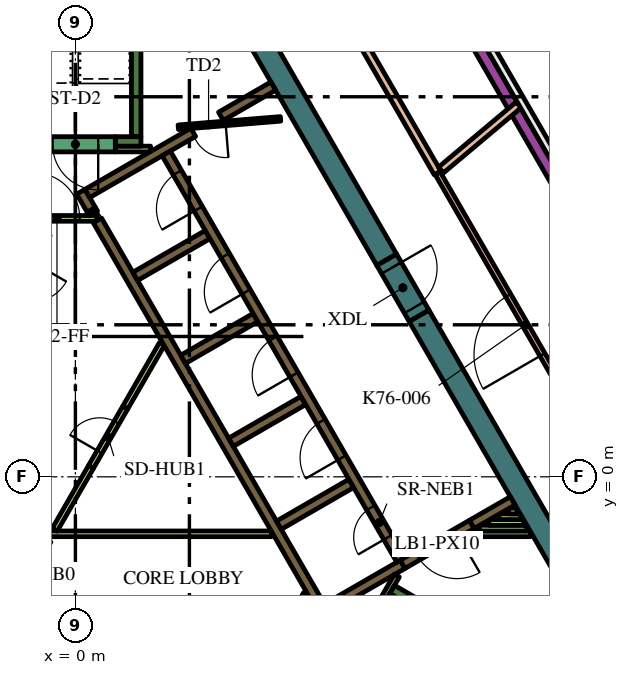
"""IFC4 building model, lengths in metres.
Left out: names, types, materials, properties, quantities, classifications, styles, units other than length and angle.
Written with IfcOpenShell. Run it as: python <this file> out.ifc"""

import sys

from ifc_helpers import new_model, si_unit, direction, frame, frame_2d, origin, place, context, subcontext, project, spatial, rectangle, extrude, element, fill, save


model = new_model("IFC4")
c1 = context("Model", 3, precision=1e-05, world=origin(), true_north=direction((0.0, 1.0)))
c2 = subcontext(c1, "Body", "Model", "MODEL_VIEW")
j1 = project(units=[si_unit("LENGTHUNIT", "METRE"), si_unit("PLANEANGLEUNIT", "RADIAN")], contexts=[c1])
p1 = place(None, origin())
s1 = spatial("IfcSite", under=j1, at=p1, CompositionType="ELEMENT")
p2 = place(p1, origin())
s2 = spatial("IfcBuilding", under=s1, at=p2, CompositionType="ELEMENT")
p3 = place(p2, frame((0.0, 0.0, 327.6)))
s3 = spatial("IfcBuildingStorey", under=s2, at=p3, CompositionType="ELEMENT", Elevation=327.6)
for number, where, z_axis, x_axis in (
    (1, (9.042, 4.239, 0.0), (0.0, 0.0, 1.0), (0.5, -0.866, 0.0)),
    (2, (1.989, 16.456, 0.0), (0.0, 0.0, 1.0), (0.5, -0.866, 0.0)),
):
    element("IfcWall", number, at=place(p3, frame(where, z_axis=z_axis, x_axis=x_axis)), inside=s3, PredefinedType="SOLIDWALL", context=c2, shape_type="SweptSolid", body=[
        extrude(rectangle(XDim=12.406, YDim=0.6, at=frame_2d((6.203, 0.0))), origin(), (0.0, 0.0, 1.0), 4.2),
    ])
p4 = place(p3, frame((8.334, -2.964, 0.0), z_axis=(0.0, 0.0, 1.0), x_axis=(0.866016039709, -0.500016218704, 0.0)))
e3 = element("IfcWall", 3, at=p4, inside=s3, PredefinedType="SOLIDWALL", context=c2, shape_type="SweptSolid", body=[
    extrude(rectangle(XDim=7.05, YDim=0.25, at=frame_2d((3.525, 0.0))), origin(), (0.0, 0.0, 1.0), 4.2),
])
p5 = place(p3, frame((8.168, -3.503, 0.0), z_axis=(0.0, 0.0, 1.0), x_axis=(0.49972245349, 0.866185586049, 0.0)))
e4 = element("IfcWall", 4, at=p5, inside=s3, PredefinedType="SOLIDWALL", context=c2, shape_type="SweptSolid", body=[
    extrude(rectangle(XDim=0.425, YDim=0.25, at=frame_2d((0.212, 0.0))), origin(), (0.0, 0.0, 1.0), 4.2),
])
p6 = place(p3, frame((1.6, 8.95, 0.0), z_axis=(0.0, 0.0, 1.0), x_axis=(0.0, 1.0, 0.0)))
e5 = element("IfcWall", 5, at=p6, inside=s3, PredefinedType="SOLIDWALL", context=c2, shape_type="SweptSolid", body=[
    extrude(rectangle(XDim=6.8, YDim=0.25, at=frame_2d((3.4, 0.0))), origin(), (0.0, 0.0, 1.0), 4.2),
])
p7 = place(p3, frame((1.05, 8.825, 0.0), z_axis=(0.0, 0.0, 1.0), x_axis=(1.0, 0.0, 0.0)))
e6 = element("IfcWall", 6, at=p7, inside=s3, PredefinedType="SOLIDWALL", context=c2, shape_type="SweptSolid", body=[
    extrude(rectangle(XDim=0.675, YDim=0.25, at=frame_2d((0.337, 0.0))), origin(), (0.0, 0.0, 1.0), 4.2),
])
p8 = place(p3, frame((11.507, -0.631, 0.0), z_axis=(0.0, 0.0, 1.0), x_axis=(-0.866025525965, -0.499999788377, 0.0)))
e7 = element("IfcWall", 7, at=p8, inside=s3, PredefinedType="SOLIDWALL", context=c2, shape_type="SweptSolid", body=[
    extrude(rectangle(XDim=1.245, YDim=0.25, at=frame_2d((0.622, 0.0))), origin(), (0.0, 0.0, 1.0), 4.2),
])
p9 = place(p3, frame((0.473, 6.93, 0.0), z_axis=(0.0, 0.0, 1.0), x_axis=(-0.49972245349, 0.866185586049, 0.0)))
e8 = element("IfcWall", 8, at=p9, inside=s3, PredefinedType="SOLIDWALL", context=c2, shape_type="SweptSolid", body=[
    extrude(rectangle(XDim=0.11, YDim=0.25, at=frame_2d((0.055, 0.0))), origin(), (0.0, 0.0, 1.0), 4.2),
])
p10 = place(p3, frame((6.568, -3.627, 0.0), z_axis=(0.0, 0.0, 1.0), x_axis=(-0.499999455981, 0.866025717874, 0.0)))
e9 = element("IfcWall", 9, at=p10, inside=s3, PredefinedType="SOLIDWALL", context=c2, shape_type="SweptSolid", body=[
    extrude(rectangle(XDim=11.978, YDim=0.25, at=frame_2d((5.989, 0.0))), origin(), (0.0, 0.0, 1.0), 4.2),
])
p11 = place(p3, frame((0.417, 7.027, 0.0), z_axis=(0.0, 0.0, 1.0), x_axis=(-0.500210807569, 0.865903659763, 0.0)))
e10 = element("IfcWall", 10, at=p11, inside=s3, PredefinedType="SOLIDWALL", context=c2, shape_type="SweptSolid", body=[
    extrude(rectangle(XDim=0.548, YDim=0.25, at=frame_2d((0.274, 0.0))), origin(), (0.0, 0.0, 1.0), 4.2),
])
p12 = place(p3, frame((3.1, 9.064, 0.0), z_axis=(0.0, 0.0, 1.0), x_axis=(-0.866030133475, -0.499991807846, 0.0)))
e11 = element("IfcWall", 11, at=p12, inside=s3, PredefinedType="SOLIDWALL", context=c2, shape_type="SweptSolid", body=[
    extrude(rectangle(XDim=3.217, YDim=0.25, at=frame_2d((1.608, 0.0))), origin(), (0.0, 0.0, 1.0), 4.2),
])
p13 = place(p3, frame((1.574, 5.274, 0.0), z_axis=(0.0, 0.0, 1.0), x_axis=(0.866028486751, 0.499994660107, 0.0)))
e12 = element("IfcWall", 12, at=p13, inside=s3, PredefinedType="SOLIDWALL", context=c2, shape_type="SweptSolid", body=[
    extrude(rectangle(XDim=2.2, YDim=0.25, at=frame_2d((1.1, 0.0))), origin(), (0.0, 0.0, 1.0), 4.2),
])
for number, where, z_axis, x_axis in (
    (13, (2.834, 3.091, 0.0), (0.0, 0.0, 1.0), (0.866, 0.5, 0.0)),
    (14, (4.094, 0.909, 0.0), (0.0, 0.0, 1.0), (0.866, 0.5, 0.0)),
    (15, (5.354, -1.274, 0.0), (0.0, 0.0, 1.0), (0.866, 0.5, 0.0)),
):
    element("IfcWall", number, at=place(p3, frame(where, z_axis=z_axis, x_axis=x_axis)), inside=s3, PredefinedType="SOLIDWALL", context=c2, shape_type="SweptSolid", body=[
        extrude(rectangle(XDim=2.2, YDim=0.25, at=frame_2d((1.1, 0.0))), origin(), (0.0, 0.0, 1.0), 4.2),
    ])
p14 = place(p3, frame((6.614, -3.456, 0.0), z_axis=(0.0, 0.0, 1.0), x_axis=(0.866025089694, 0.500000544019, 0.0)))
e16 = element("IfcWall", 16, at=p14, inside=s3, PredefinedType="SOLIDWALL", context=c2, shape_type="SweptSolid", body=[
    extrude(rectangle(XDim=2.305, YDim=0.25, at=frame_2d((1.153, 0.0))), origin(), (0.0, 0.0, 1.0), 4.2),
])
p15 = place(p3, frame((3.83, 9.486, 0.0), z_axis=(0.0, 0.0, 1.0), x_axis=(0.865986202621, 0.500067892261, 0.0)))
e17 = element("IfcWall", 17, at=p15, inside=s3, PredefinedType="SOLIDWALL", context=c2, shape_type="SweptSolid", body=[
    extrude(rectangle(XDim=1.591, YDim=0.25, at=frame_2d((0.795, 0.0))), origin(), (0.0, 0.0, 1.0), 4.2),
])
p16 = place(p3, frame((1.05, 8.625, 0.0), z_axis=(0.0, 0.0, 1.0), x_axis=(1.0, 0.0, 0.0)))
e18 = element("IfcWall", 18, at=p16, inside=s3, PredefinedType="PARTITIONING", context=c2, shape_type="SweptSolid", body=[
    extrude(rectangle(XDim=0.929, YDim=0.15, at=frame_2d((0.464, 0.0))), origin(), (0.0, 0.0, 1.0), 3.45),
])
p17 = place(p3, frame((10.362, -1.5, 0.0), z_axis=(0.0, 0.0, 1.0), x_axis=(1.0, 0.0, 0.0)))
e19 = element("IfcWall", 19, at=p17, inside=s3, PredefinedType="PARTITIONING", context=c2, shape_type="SweptSolid", body=[
    extrude(rectangle(XDim=1.61, YDim=0.15, at=frame_2d((0.805, 0.0))), origin(), (0.0, 0.0, 1.0), 3.45),
])
p18 = place(p3, frame((10.622, -1.35, 0.0), z_axis=(0.0, 0.0, 1.0), x_axis=(1.0, 0.0, 0.0)))
e20 = element("IfcWall", 20, at=p18, inside=s3, PredefinedType="PARTITIONING", context=c2, shape_type="SweptSolid", body=[
    extrude(rectangle(XDim=1.263, YDim=0.15, at=frame_2d((0.632, 0.0))), origin(), (0.0, 0.0, 1.0), 3.45),
])
p19 = place(p3, frame((10.882, -1.2, 0.0), z_axis=(0.0, 0.0, 1.0), x_axis=(1.0, 0.0, 0.0)))
e21 = element("IfcWall", 21, at=p19, inside=s3, PredefinedType="PARTITIONING", context=c2, shape_type="SweptSolid", body=[
    extrude(rectangle(XDim=0.917, YDim=0.15, at=frame_2d((0.459, 0.0))), origin(), (0.0, 0.0, 1.0), 3.45),
])
p20 = place(p3, frame((11.712, -1.05, 0.0), z_axis=(0.0, 0.0, 1.0), x_axis=(-1.0, 0.0, 0.0)))
e22 = element("IfcWall", 22, at=p20, inside=s3, PredefinedType="PARTITIONING", context=c2, shape_type="SweptSolid", body=[
    extrude(rectangle(XDim=0.571, YDim=0.15, at=frame_2d((0.285, 0.0))), origin(), (0.0, 0.0, 1.0), 3.45),
])
p21 = place(p3, frame((11.401, -0.9, 0.0), z_axis=(0.0, 0.0, 1.0), x_axis=(1.0, 0.0, 0.0)))
e23 = element("IfcWall", 23, at=p21, inside=s3, PredefinedType="PARTITIONING", context=c2, shape_type="SweptSolid", body=[
    extrude(rectangle(XDim=0.224, YDim=0.15, at=frame_2d((0.112, 0.0))), origin(), (0.0, 0.0, 1.0), 3.45),
])
p22 = place(p3, frame((8.459, -2.599, 0.0), z_axis=(0.0, 0.0, 1.0), x_axis=(-0.500041054325, -0.866001699761, 0.0)))
e24 = element("IfcWall", 24, at=p22, inside=s3, PredefinedType="PARTITIONING", context=c2, shape_type="SweptSolid", body=[
    extrude(rectangle(XDim=0.929, YDim=0.15, at=frame_2d((0.464, 0.0))), origin(), (0.0, 0.0, 1.0), 4.2),
])
p23 = place(p3, frame((5.705, -3.718, 0.0), z_axis=(0.0, 0.0, 1.0), x_axis=(0.499962090823, 0.866047289552, 0.0)))
e25 = element("IfcWall", 25, at=p23, inside=s3, PredefinedType="PARTITIONING", context=c2, shape_type="SweptSolid", body=[
    extrude(rectangle(XDim=0.735, YDim=0.15, at=frame_2d((0.367, 0.0))), origin(), (0.0, 0.0, 1.0), 3.45),
])
p24 = place(p3, frame((-4.2, -1.5, 0.0), z_axis=(0.0, 0.0, 1.0), x_axis=(1.0, 0.0, 0.0)))
e26 = element("IfcWall", 26, at=p24, inside=s3, PredefinedType="PARTITIONING", context=c2, shape_type="SweptSolid", body=[
    extrude(rectangle(XDim=9.359, YDim=0.15, at=frame_2d((4.68, 0.0))), origin(), (0.0, 0.0, 1.0), 3.45),
])
p25 = place(p3, frame((-0.544, -1.393, 0.0), z_axis=(0.0, 0.0, 1.0), x_axis=(0.499928740635, 0.866066541489, 0.0)))
e27 = element("IfcWall", 27, at=p25, inside=s3, PredefinedType="PARTITIONING", context=c2, shape_type="SweptSolid", body=[
    extrude(rectangle(XDim=1.912, YDim=0.15, at=frame_2d((0.956, 0.0))), origin(), (0.0, 0.0, 1.0), 3.45),
])
p26 = place(p3, frame((1.312, 1.822, 0.0), z_axis=(0.0, 0.0, 1.0), x_axis=(0.500003549559, 0.866023354436, 0.0)))
e28 = element("IfcWall", 28, at=p26, inside=s3, PredefinedType="PARTITIONING", context=c2, shape_type="SweptSolid", body=[
    extrude(rectangle(XDim=1.93, YDim=0.15, at=frame_2d((0.965, 0.0))), origin(), (0.0, 0.0, 1.0), 3.45),
])
p27 = place(p3, frame((8.565, -2.185, 0.0), z_axis=(0.0, 0.0, 1.0), x_axis=(-0.499997954832, 0.866026584559, 0.0)))
e29 = element("IfcWall", 29, at=p27, inside=s3, PredefinedType="SOLIDWALL", context=c2, shape_type="SweptSolid", body=[
    extrude(rectangle(XDim=12.35, YDim=0.25, at=frame_2d((6.175, 0.0))), origin(), (0.0, 0.0, 1.0), 4.2),
])
p28 = place(p27, frame((0.685, 0.0, 0.0)))
e30 = element("IfcOpeningElement", 30, at=p28, cuts=e29, PredefinedType="OPENING", context=c2, shape_type="SweptSolid", body=[
    extrude(rectangle(XDim=0.9, YDim=2.1, at=frame_2d((0.45, 1.05))), frame((0.0, 0.135, 0.0), z_axis=(0.0, -1.0, 0.0), x_axis=(1.0, 0.0, 0.0)), (0.0, 0.0, 1.0), 0.27),
])
p29 = place(p27, frame((3.105, 0.0, 0.0)))
e31 = element("IfcOpeningElement", 31, at=p29, cuts=e29, PredefinedType="OPENING", context=c2, shape_type="SweptSolid", body=[
    extrude(rectangle(XDim=1.1, YDim=2.1, at=frame_2d((0.55, 1.05))), frame((0.0, 0.135, 0.0), z_axis=(0.0, -1.0, 0.0), x_axis=(1.0, 0.0, 0.0)), (0.0, 0.0, 1.0), 0.27),
])
p30 = place(p27, frame((5.625, 0.0, 0.0)))
e32 = element("IfcOpeningElement", 32, at=p30, cuts=e29, PredefinedType="OPENING", context=c2, shape_type="SweptSolid", body=[
    extrude(rectangle(XDim=1.1, YDim=2.1, at=frame_2d((0.55, 1.05))), frame((0.0, 0.135, 0.0), z_axis=(0.0, -1.0, 0.0), x_axis=(1.0, 0.0, 0.0)), (0.0, 0.0, 1.0), 0.27),
])
p31 = place(p27, frame((8.145, 0.0, 0.0)))
e33 = element("IfcOpeningElement", 33, at=p31, cuts=e29, PredefinedType="OPENING", context=c2, shape_type="SweptSolid", body=[
    extrude(rectangle(XDim=1.1, YDim=2.1, at=frame_2d((0.55, 1.05))), frame((0.0, 0.135, 0.0), z_axis=(0.0, -1.0, 0.0), x_axis=(1.0, 0.0, 0.0)), (0.0, 0.0, 1.0), 0.27),
])
p32 = place(p27, frame((10.665, 0.0, 0.0)))
e34 = element("IfcOpeningElement", 34, at=p32, cuts=e29, PredefinedType="OPENING", context=c2, shape_type="SweptSolid", body=[
    extrude(rectangle(XDim=1.1, YDim=2.1, at=frame_2d((0.55, 1.05))), frame((0.0, 0.135, 0.0), z_axis=(0.0, -1.0, 0.0), x_axis=(1.0, 0.0, 0.0)), (0.0, 0.0, 1.0), 0.27),
])
p33 = place(p3, frame((1.05, 8.75, 0.0), z_axis=(0.0, 0.0, 1.0), x_axis=(-1.0, 0.0, 0.0)))
e35 = element("IfcWall", 35, at=p33, inside=s3, PredefinedType="SOLIDWALL", context=c2, shape_type="SweptSolid", body=[
    extrude(rectangle(XDim=2.1, YDim=0.4, at=frame_2d((1.05, 0.0))), origin(), (0.0, 0.0, 1.0), 4.2),
])
p34 = place(p33, frame((0.45, 0.0, 0.0)))
e36 = element("IfcOpeningElement", 36, at=p34, cuts=e35, PredefinedType="OPENING", context=c2, shape_type="SweptSolid", body=[
    extrude(rectangle(XDim=1.2, YDim=2.1, at=frame_2d((0.6, 1.05))), frame((0.0, 0.21, 0.0), z_axis=(0.0, -1.0, 0.0), x_axis=(1.0, 0.0, 0.0)), (0.0, 0.0, 1.0), 0.42),
])
p35 = place(p3, frame((5.398, 9.419, 0.0), z_axis=(0.0, 0.0, 1.0), x_axis=(-0.996653416376, -0.081743303248, 0.0)))
e37 = element("IfcWall", 37, at=p35, inside=s3, PredefinedType="PARTITIONING", context=c2, shape_type="SweptSolid", body=[
    extrude(rectangle(XDim=2.7, YDim=0.12, at=frame_2d((1.35, 0.0))), origin(), (0.0, 0.0, 1.0), 3.45),
])
p36 = place(p35, frame((1.45, 0.0, 0.0)))
e38 = element("IfcOpeningElement", 38, at=p36, cuts=e37, PredefinedType="OPENING", context=c2, shape_type="SweptSolid", body=[
    extrude(rectangle(XDim=0.9, YDim=2.1, at=frame_2d((0.45, 1.05))), frame((0.0, 0.07, 0.0), z_axis=(0.0, -1.0, 0.0), x_axis=(1.0, 0.0, 0.0)), (0.0, 0.0, 1.0), 0.14),
])
p37 = place(p3, frame((-1.534, 6.8, 0.0), z_axis=(0.0, 0.0, 1.0), x_axis=(1.0, 0.0, 0.0)))
e39 = element("IfcWall", 39, at=p37, inside=s3, PredefinedType="PARTITIONING", context=c2, shape_type="SweptSolid", body=[
    extrude(rectangle(XDim=2.1, YDim=0.15, at=frame_2d((1.05, 0.0))), origin(), (0.0, 0.0, 1.0), 3.45),
])
p38 = place(p37, frame((0.45, 0.0, 0.0)))
e40 = element("IfcOpeningElement", 40, at=p38, cuts=e39, PredefinedType="OPENING", context=c2, shape_type="SweptSolid", body=[
    extrude(rectangle(XDim=1.2, YDim=2.1, at=frame_2d((0.6, 1.05))), frame((0.0, 0.085, 0.0), z_axis=(0.0, -1.0, 0.0), x_axis=(1.0, 0.0, 0.0)), (0.0, 0.0, 1.0), 0.17),
])
p39 = place(p3, frame((10.429, -1.253, 0.0), z_axis=(0.0, 0.0, 1.0), x_axis=(-0.866009402589, -0.500027713859, 0.0)))
e41 = element("IfcWall", 41, at=p39, inside=s3, PredefinedType="SOLIDWALL", context=c2, shape_type="SweptSolid", body=[
    extrude(rectangle(XDim=2.1, YDim=0.25, at=frame_2d((1.05, 0.0))), origin(), (0.0, 0.0, 1.0), 4.2),
])
p40 = place(p39, frame((0.45, 0.0, 0.0)))
e42 = element("IfcOpeningElement", 42, at=p40, cuts=e41, PredefinedType="OPENING", context=c2, shape_type="SweptSolid", body=[
    extrude(rectangle(XDim=1.2, YDim=2.1, at=frame_2d((0.6, 1.05))), frame((0.0, 0.135, 0.0), z_axis=(0.0, -1.0, 0.0), x_axis=(1.0, 0.0, 0.0)), (0.0, 0.0, 1.0), 0.27),
])
p41 = place(p3, frame((8.192, 5.711, 0.0), z_axis=(0.0, 0.0, 1.0), x_axis=(0.500062241894, -0.865989465428, 0.0)))
e43 = element("IfcWall", 43, at=p41, inside=s3, PredefinedType="SOLIDWALL", context=c2, shape_type="SweptSolid", body=[
    extrude(rectangle(XDim=1.7, YDim=0.6, at=frame_2d((0.85, 0.0))), origin(), (0.0, 0.0, 1.0), 4.2),
])
p42 = place(p41, frame((0.25, 0.0, 0.0)))
e44 = element("IfcOpeningElement", 44, at=p42, cuts=e43, PredefinedType="OPENING", context=c2, shape_type="SweptSolid", body=[
    extrude(rectangle(XDim=1.2, YDim=2.1, at=frame_2d((0.6, 1.05))), frame((0.0, 0.31, 0.0), z_axis=(0.0, -1.0, 0.0), x_axis=(1.0, 0.0, 0.0)), (0.0, 0.0, 1.0), 0.62),
])
p43 = place(p3, frame((0.412, 0.263, 0.0), z_axis=(0.0, 0.0, 1.0), x_axis=(0.500062916607, 0.865989075817, 0.0)))
e45 = element("IfcWall", 45, at=p43, inside=s3, PredefinedType="PARTITIONING", context=c2, shape_type="SweptSolid", body=[
    extrude(rectangle(XDim=1.8, YDim=0.15, at=frame_2d((0.9, 0.0))), origin(), (0.0, 0.0, 1.0), 3.45),
])
p44 = place(p43, frame((0.45, 0.0, 0.0)))
e46 = element("IfcOpeningElement", 46, at=p44, cuts=e45, PredefinedType="OPENING", context=c2, shape_type="SweptSolid", body=[
    extrude(rectangle(XDim=0.9, YDim=2.1, at=frame_2d((0.45, 1.05))), frame((0.0, 0.085, 0.0), z_axis=(0.0, -1.0, 0.0), x_axis=(1.0, 0.0, 0.0)), (0.0, 0.0, 1.0), 0.17),
])
p45 = place(p3, frame((9.529, 7.995, 0.0), z_axis=(0.0, 0.0, 1.0), x_axis=(-0.499979608858, 0.866037176296, 0.0)))
e47 = element("IfcWall", 47, at=p45, inside=s3, PredefinedType="PARTITIONING", context=c2, shape_type="SweptSolid", body=[
    extrude(rectangle(XDim=12.245, YDim=0.2, at=frame_2d((6.123, 0.0))), origin(), (0.0, 0.0, 1.0), 3.45),
])
p46 = place(p45, frame((5.522, 0.0, 0.0)))
e48 = element("IfcOpeningElement", 48, at=p46, cuts=e47, PredefinedType="OPENING", context=c2, shape_type="SweptSolid", body=[
    extrude(rectangle(XDim=1.2, YDim=2.1, at=frame_2d((0.6, 1.05))), frame((0.0, 0.11, 0.0), z_axis=(0.0, -1.0, 0.0), x_axis=(1.0, 0.0, 0.0)), (0.0, 0.0, 1.0), 0.22),
])
p47 = place(p3, frame((14.145, -0.0, 0.0), z_axis=(0.0, 0.0, 1.0), x_axis=(-0.500008111839, 0.866020720362, 0.0)))
e49 = element("IfcWall", 49, at=p47, inside=s3, PredefinedType="PARTITIONING", context=c2, shape_type="SweptSolid", body=[
    extrude(rectangle(XDim=9.223, YDim=0.15, at=frame_2d((4.611, 0.0))), origin(), (0.0, 0.0, 1.0), 3.45),
])
p48 = place(p47, frame((3.711, 0.0, 0.0)))
e50 = element("IfcOpeningElement", 50, at=p48, cuts=e49, PredefinedType="OPENING", context=c2, shape_type="SweptSolid", body=[
    extrude(rectangle(XDim=1.8, YDim=2.1, at=frame_2d((0.9, 1.05))), frame((0.0, 0.085, 0.0), z_axis=(0.0, -1.0, 0.0), x_axis=(1.0, 0.0, 0.0)), (0.0, 0.0, 1.0), 0.17),
])
p49 = place(p3, frame((9.621, 8.073, 0.0), z_axis=(0.0, 0.0, 1.0), x_axis=(0.766049084948, 0.64278207773, 0.0)))
e51 = element("IfcWall", 51, at=p49, inside=s3, PredefinedType="PARTITIONING", context=c2, shape_type="SweptSolid", body=[
    extrude(rectangle(XDim=2.668, YDim=0.2, at=frame_2d((1.334, 0.0))), origin(), (0.0, 0.0, 1.0), 3.45),
])
p50 = place(p3, frame((18.181, -1.79, 0.0), z_axis=(0.0, 0.0, 1.0), x_axis=(-0.500002158106, 0.866024157798, 0.0)))
e52 = element("IfcWall", 52, at=p50, inside=s3, PredefinedType="SOLIDWALL", context=c2, shape_type="SweptSolid", body=[
    extrude(rectangle(XDim=21.282, YDim=0.3, at=frame_2d((10.641, 0.0))), origin(), (0.0, 0.0, 1.0), 3.45),
])
p51 = place(p28, origin())
e53 = element("IfcDoor", 53, at=p51, inside=s3, OperationType="SINGLE_SWING_LEFT", PredefinedType="DOOR", context=c2, shape_type="SweptSolid", body=[
    extrude(rectangle(XDim=0.9, YDim=2.1, at=frame_2d((0.45, 1.05))), frame((0.0, 0.025, 0.0), z_axis=(0.0, -1.0, 0.0), x_axis=(1.0, 0.0, 0.0)), (0.0, 0.0, 1.0), 0.05),
])
fill(e30, e53)
p52 = place(p29, origin())
e54 = element("IfcDoor", 54, at=p52, inside=s3, OperationType="DOUBLE_DOOR_SLIDING", PredefinedType="DOOR", context=c2, shape_type="SweptSolid", body=[
    extrude(rectangle(XDim=1.1, YDim=2.1, at=frame_2d((0.55, 1.05))), frame((0.0, 0.025, 0.0), z_axis=(0.0, -1.0, 0.0), x_axis=(1.0, 0.0, 0.0)), (0.0, 0.0, 1.0), 0.05),
])
fill(e31, e54)
p53 = place(p30, origin())
e55 = element("IfcDoor", 55, at=p53, inside=s3, OperationType="DOUBLE_DOOR_SLIDING", PredefinedType="DOOR", context=c2, shape_type="SweptSolid", body=[
    extrude(rectangle(XDim=1.1, YDim=2.1, at=frame_2d((0.55, 1.05))), frame((0.0, 0.025, 0.0), z_axis=(0.0, -1.0, 0.0), x_axis=(1.0, 0.0, 0.0)), (0.0, 0.0, 1.0), 0.05),
])
fill(e32, e55)
p54 = place(p31, origin())
e56 = element("IfcDoor", 56, at=p54, inside=s3, OperationType="DOUBLE_DOOR_SLIDING", PredefinedType="DOOR", context=c2, shape_type="SweptSolid", body=[
    extrude(rectangle(XDim=1.1, YDim=2.1, at=frame_2d((0.55, 1.05))), frame((0.0, 0.025, 0.0), z_axis=(0.0, -1.0, 0.0), x_axis=(1.0, 0.0, 0.0)), (0.0, 0.0, 1.0), 0.05),
])
fill(e33, e56)
p55 = place(p32, origin())
e57 = element("IfcDoor", 57, at=p55, inside=s3, OperationType="DOUBLE_DOOR_SLIDING", PredefinedType="DOOR", context=c2, shape_type="SweptSolid", body=[
    extrude(rectangle(XDim=1.1, YDim=2.1, at=frame_2d((0.55, 1.05))), frame((0.0, 0.025, 0.0), z_axis=(0.0, -1.0, 0.0), x_axis=(1.0, 0.0, 0.0)), (0.0, 0.0, 1.0), 0.05),
])
fill(e34, e57)
p56 = place(p34, origin())
e58 = element("IfcDoor", 58, at=p56, inside=s3, OperationType="SINGLE_SWING_LEFT", PredefinedType="DOOR", context=c2, shape_type="SweptSolid", body=[
    extrude(rectangle(XDim=1.2, YDim=2.1, at=frame_2d((0.6, 1.05))), frame((0.0, 0.025, 0.0), z_axis=(0.0, -1.0, 0.0), x_axis=(1.0, 0.0, 0.0)), (0.0, 0.0, 1.0), 0.05),
])
fill(e36, e58)
p57 = place(p36, origin())
e59 = element("IfcDoor", 59, at=p57, inside=s3, OperationType="SINGLE_SWING_LEFT", PredefinedType="DOOR", context=c2, shape_type="SweptSolid", body=[
    extrude(rectangle(XDim=0.9, YDim=2.1, at=frame_2d((0.45, 1.05))), frame((0.0, 0.025, 0.0), z_axis=(0.0, -1.0, 0.0), x_axis=(1.0, 0.0, 0.0)), (0.0, 0.0, 1.0), 0.05),
])
fill(e38, e59)
p58 = place(p38, origin())
e60 = element("IfcDoor", 60, at=p58, inside=s3, OperationType="SINGLE_SWING_LEFT", PredefinedType="DOOR", context=c2, shape_type="SweptSolid", body=[
    extrude(rectangle(XDim=1.2, YDim=2.1, at=frame_2d((0.6, 1.05))), frame((0.0, 0.025, 0.0), z_axis=(0.0, -1.0, 0.0), x_axis=(1.0, 0.0, 0.0)), (0.0, 0.0, 1.0), 0.05),
])
fill(e40, e60)
p59 = place(p40, origin())
e61 = element("IfcDoor", 61, at=p59, inside=s3, OperationType="SINGLE_SWING_LEFT", PredefinedType="DOOR", context=c2, shape_type="SweptSolid", body=[
    extrude(rectangle(XDim=1.2, YDim=2.1, at=frame_2d((0.6, 1.05))), frame((0.0, 0.025, 0.0), z_axis=(0.0, -1.0, 0.0), x_axis=(1.0, 0.0, 0.0)), (0.0, 0.0, 1.0), 0.05),
])
fill(e42, e61)
p60 = place(p42, origin())
e62 = element("IfcDoor", 62, at=p60, inside=s3, OperationType="SINGLE_SWING_LEFT", PredefinedType="DOOR", context=c2, shape_type="SweptSolid", body=[
    extrude(rectangle(XDim=1.2, YDim=2.1, at=frame_2d((0.6, 1.05))), frame((0.0, 0.025, 0.0), z_axis=(0.0, -1.0, 0.0), x_axis=(1.0, 0.0, 0.0)), (0.0, 0.0, 1.0), 0.05),
])
fill(e44, e62)
p61 = place(p44, origin())
e63 = element("IfcDoor", 63, at=p61, inside=s3, OperationType="SINGLE_SWING_LEFT", PredefinedType="DOOR", context=c2, shape_type="SweptSolid", body=[
    extrude(rectangle(XDim=0.9, YDim=2.1, at=frame_2d((0.45, 1.05))), frame((0.0, 0.025, 0.0), z_axis=(0.0, -1.0, 0.0), x_axis=(1.0, 0.0, 0.0)), (0.0, 0.0, 1.0), 0.05),
])
fill(e46, e63)
p62 = place(p48, origin())
e64 = element("IfcDoor", 64, at=p62, inside=s3, OperationType="DOUBLE_DOOR_SINGLE_SWING", PredefinedType="DOOR", context=c2, shape_type="SweptSolid", body=[
    extrude(rectangle(XDim=1.8, YDim=2.1, at=frame_2d((0.9, 1.05))), frame((0.0, 0.025, 0.0), z_axis=(0.0, -1.0, 0.0), x_axis=(1.0, 0.0, 0.0)), (0.0, 0.0, 1.0), 0.05),
])
fill(e50, e64)
save(model, sys.argv[1])
